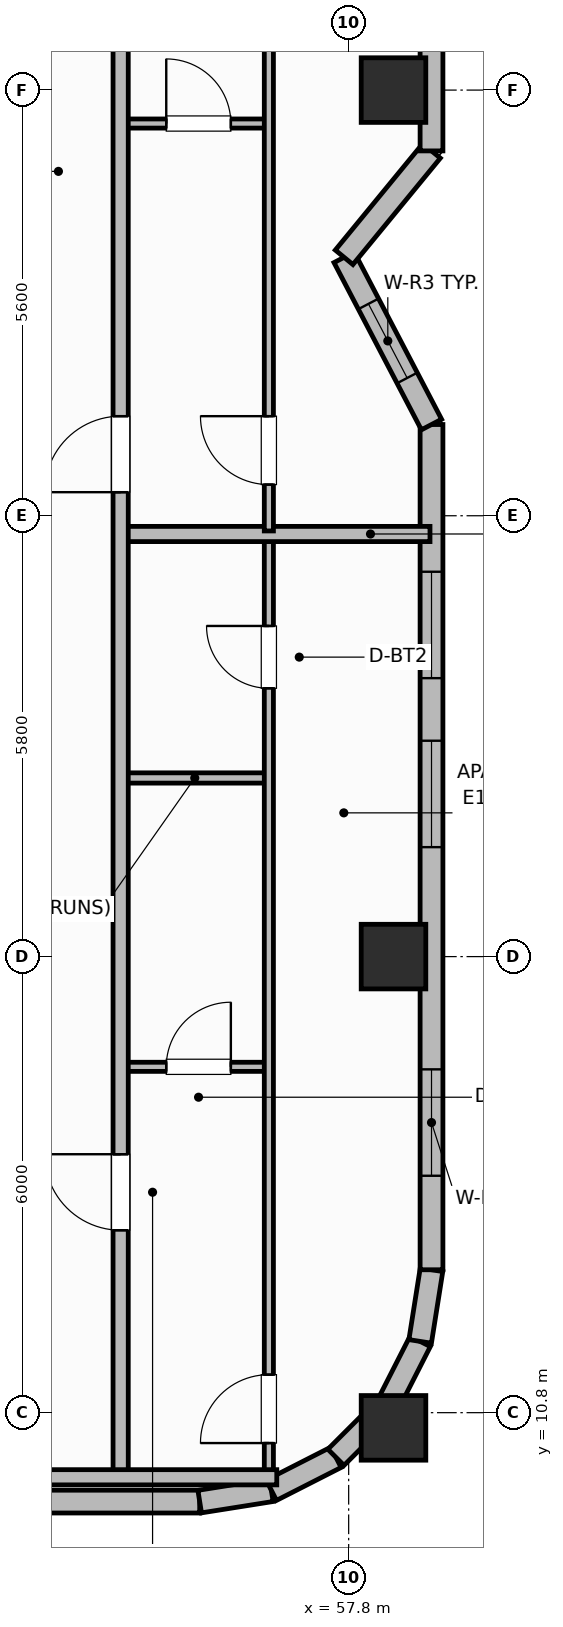
"""IFC4 building model, lengths in metres.
Left out: names, types, materials, properties, quantities, classifications, styles, units other than length and angle.
Written with IfcOpenShell. Run it as: python <this file> out.ifc"""

import sys

from ifc_helpers import new_model, si_unit, direction, frame, frame_2d, origin, origin_2d, place, context, subcontext, project, spatial, rectangle, extrude, element, fill, save


model = new_model("IFC4")
c1 = context("Model", 3, precision=1e-05, world=origin(), true_north=direction((0.0, 1.0)))
c2 = subcontext(c1, "Body", "Model", "MODEL_VIEW")
j1 = project(units=[si_unit("LENGTHUNIT", "METRE"), si_unit("PLANEANGLEUNIT", "RADIAN")], contexts=[c1])
p1 = place(None, origin())
s1 = spatial("IfcSite", under=j1, at=p1, CompositionType="ELEMENT")
p2 = place(p1, origin())
s2 = spatial("IfcBuilding", under=s1, at=p2, CompositionType="ELEMENT")
p3 = place(p2, frame((0.0, 0.0, 244.3)))
s3 = spatial("IfcBuildingStorey", under=s2, at=p3, CompositionType="ELEMENT", Elevation=244.3)
for number, where, z_axis, x_axis in (
    (1, (58.39, 10.6, 0.0), (0.0, 0.0, 1.0), (1.0, 0.0, 0.0)),
    (2, (58.39, 16.8, 0.0), (0.0, 0.0, 1.0), (1.0, 0.0, 0.0)),
    (3, (58.39, 28.2, 0.0), (0.0, 0.0, 1.0), (1.0, 0.0, 0.0)),
):
    element("IfcColumn", number, at=place(p3, frame(where, z_axis=z_axis, x_axis=x_axis)), inside=s3, PredefinedType="COLUMN", context=c2, shape_type="SweptSolid", body=[
        extrude(rectangle(XDim=0.85, YDim=0.85, at=origin_2d()), origin(), (0.0, 0.0, 1.0), 3.7),
    ])
p4 = place(p3, frame((22.56, 9.63, 0.0), z_axis=(0.0, 0.0, 1.0), x_axis=(1.0, 0.0, 0.0)))
e4 = element("IfcWall", 4, at=p4, inside=s3, PredefinedType="SOLIDWALL", context=c2, shape_type="SweptSolid", body=[
    extrude(rectangle(XDim=33.28, YDim=0.3, at=frame_2d((16.64, 0.0))), origin(), (0.0, 0.0, 1.0), 2.73),
])
p5 = place(p4, frame((4.647, 0.0, 0.71)))
e5 = element("IfcOpeningElement", 5, at=p5, cuts=e4, PredefinedType="OPENING", context=c2, shape_type="SweptSolid", body=[
    extrude(rectangle(XDim=1.6, YDim=1.9, at=frame_2d((0.8, 0.95))), frame((0.0, 0.16, 0.0), z_axis=(0.0, -1.0, 0.0), x_axis=(1.0, 0.0, 0.0)), (0.0, 0.0, 1.0), 0.32),
])
p6 = place(p4, frame((7.845, 0.0, 0.71)))
e6 = element("IfcOpeningElement", 6, at=p6, cuts=e4, PredefinedType="OPENING", context=c2, shape_type="SweptSolid", body=[
    extrude(rectangle(XDim=1.6, YDim=1.9, at=frame_2d((0.8, 0.95))), frame((0.0, 0.16, 0.0), z_axis=(0.0, -1.0, 0.0), x_axis=(1.0, 0.0, 0.0)), (0.0, 0.0, 1.0), 0.32),
])
p7 = place(p4, frame((14.241, 0.0, 0.71)))
e7 = element("IfcOpeningElement", 7, at=p7, cuts=e4, PredefinedType="OPENING", context=c2, shape_type="SweptSolid", body=[
    extrude(rectangle(XDim=1.6, YDim=1.9, at=frame_2d((0.8, 0.95))), frame((0.0, 0.16, 0.0), z_axis=(0.0, -1.0, 0.0), x_axis=(1.0, 0.0, 0.0)), (0.0, 0.0, 1.0), 0.32),
])
p8 = place(p4, frame((17.439, 0.0, 0.71)))
e8 = element("IfcOpeningElement", 8, at=p8, cuts=e4, PredefinedType="OPENING", context=c2, shape_type="SweptSolid", body=[
    extrude(rectangle(XDim=1.6, YDim=1.9, at=frame_2d((0.8, 0.95))), frame((0.0, 0.16, 0.0), z_axis=(0.0, -1.0, 0.0), x_axis=(1.0, 0.0, 0.0)), (0.0, 0.0, 1.0), 0.32),
])
p9 = place(p4, frame((23.835, 0.0, 0.71)))
e9 = element("IfcOpeningElement", 9, at=p9, cuts=e4, PredefinedType="OPENING", context=c2, shape_type="SweptSolid", body=[
    extrude(rectangle(XDim=1.6, YDim=1.9, at=frame_2d((0.8, 0.95))), frame((0.0, 0.16, 0.0), z_axis=(0.0, -1.0, 0.0), x_axis=(1.0, 0.0, 0.0)), (0.0, 0.0, 1.0), 0.32),
])
p10 = place(p4, frame((27.033, 0.0, 0.71)))
e10 = element("IfcOpeningElement", 10, at=p10, cuts=e4, PredefinedType="OPENING", context=c2, shape_type="SweptSolid", body=[
    extrude(rectangle(XDim=1.6, YDim=1.9, at=frame_2d((0.8, 0.95))), frame((0.0, 0.16, 0.0), z_axis=(0.0, -1.0, 0.0), x_axis=(1.0, 0.0, 0.0)), (0.0, 0.0, 1.0), 0.32),
])
p11 = place(p3, frame((55.84, 9.63, 0.0), z_axis=(0.0, 0.0, 1.0), x_axis=(0.987663181641, 0.156593229835, 0.0)))
e11 = element("IfcWall", 11, at=p11, inside=s3, PredefinedType="SOLIDWALL", context=c2, shape_type="SweptSolid", body=[
    extrude(rectangle(XDim=0.954, YDim=0.3, at=frame_2d((0.477, 0.0))), origin(), (0.0, 0.0, 1.0), 2.73),
])
for number, where, z_axis, x_axis in (
    (12, (56.782, 9.779, 0.0), (0.0, 0.0, 1.0), (0.891, 0.454, 0.0)),
    (13, (57.633, 10.212, 0.0), (0.0, 0.0, 1.0), (0.707, 0.707, 0.0)),
    (14, (58.308, 10.887, 0.0), (0.0, 0.0, 1.0), (0.454, 0.891, 0.0)),
):
    element("IfcWall", number, at=place(p3, frame(where, z_axis=z_axis, x_axis=x_axis)), inside=s3, PredefinedType="SOLIDWALL", context=c2, shape_type="SweptSolid", body=[
        extrude(rectangle(XDim=0.954, YDim=0.3, at=frame_2d((0.477, 0.0))), origin(), (0.0, 0.0, 1.0), 2.73),
    ])
p12 = place(p3, frame((58.741, 11.738, 0.0), z_axis=(0.0, 0.0, 1.0), x_axis=(0.156343617883, 0.987702725088, 0.0)))
e15 = element("IfcWall", 15, at=p12, inside=s3, PredefinedType="SOLIDWALL", context=c2, shape_type="SweptSolid", body=[
    extrude(rectangle(XDim=0.954, YDim=0.3, at=frame_2d((0.477, 0.0))), origin(), (0.0, 0.0, 1.0), 2.73),
])
p13 = place(p3, frame((58.89, 12.68, 0.0), z_axis=(0.0, 0.0, 1.0), x_axis=(0.0, 1.0, 0.0)))
e16 = element("IfcWall", 16, at=p13, inside=s3, PredefinedType="SOLIDWALL", context=c2, shape_type="SweptSolid", body=[
    extrude(rectangle(XDim=11.12, YDim=0.3, at=frame_2d((5.56, 0.0))), origin(), (0.0, 0.0, 1.0), 2.73),
])
p14 = place(p13, frame((1.237, 0.0, 0.76)))
e17 = element("IfcOpeningElement", 17, at=p14, cuts=e16, PredefinedType="OPENING", context=c2, shape_type="SweptSolid", body=[
    extrude(rectangle(XDim=1.4, YDim=1.85, at=frame_2d((0.7, 0.925))), frame((0.0, 0.16, 0.0), z_axis=(0.0, -1.0, 0.0), x_axis=(1.0, 0.0, 0.0)), (0.0, 0.0, 1.0), 0.32),
])
p15 = place(p13, frame((5.56, 0.0, 0.76)))
e18 = element("IfcOpeningElement", 18, at=p15, cuts=e16, PredefinedType="OPENING", context=c2, shape_type="SweptSolid", body=[
    extrude(rectangle(XDim=1.4, YDim=1.85, at=frame_2d((0.7, 0.925))), frame((0.0, 0.16, 0.0), z_axis=(0.0, -1.0, 0.0), x_axis=(1.0, 0.0, 0.0)), (0.0, 0.0, 1.0), 0.32),
])
p16 = place(p13, frame((7.783, 0.0, 0.76)))
e19 = element("IfcOpeningElement", 19, at=p16, cuts=e16, PredefinedType="OPENING", context=c2, shape_type="SweptSolid", body=[
    extrude(rectangle(XDim=1.4, YDim=1.85, at=frame_2d((0.7, 0.925))), frame((0.0, 0.16, 0.0), z_axis=(0.0, -1.0, 0.0), x_axis=(1.0, 0.0, 0.0)), (0.0, 0.0, 1.0), 0.32),
])
p17 = place(p3, frame((58.89, 23.8, 0.0), z_axis=(0.0, 0.0, 1.0), x_axis=(-0.46323138706, 0.886237373418, 0.0)))
e20 = element("IfcWall", 20, at=p17, inside=s3, PredefinedType="SOLIDWALL", context=c2, shape_type="SweptSolid", body=[
    extrude(rectangle(XDim=2.482, YDim=0.3, at=frame_2d((1.241, 0.0))), origin(), (0.0, 0.0, 1.0), 2.73),
])
p18 = place(p17, frame((0.691, 0.0, 0.92)))
e21 = element("IfcOpeningElement", 21, at=p18, cuts=e20, PredefinedType="OPENING", context=c2, shape_type="SweptSolid", body=[
    extrude(rectangle(XDim=1.1, YDim=1.65, at=frame_2d((0.55, 0.825))), frame((0.0, 0.16, 0.0), z_axis=(0.0, -1.0, 0.0), x_axis=(1.0, 0.0, 0.0)), (0.0, 0.0, 1.0), 0.32),
])
p19 = place(p3, frame((57.74, 26.0, 0.0), z_axis=(0.0, 0.0, 1.0), x_axis=(0.634733675645, 0.772730975827, 0.0)))
e22 = element("IfcWall", 22, at=p19, inside=s3, PredefinedType="SOLIDWALL", context=c2, shape_type="SweptSolid", body=[
    extrude(rectangle(XDim=1.812, YDim=0.3, at=frame_2d((0.906, 0.0))), origin(), (0.0, 0.0, 1.0), 2.73),
])
p20 = place(p3, frame((58.89, 27.4, 0.0), z_axis=(0.0, 0.0, 1.0), x_axis=(0.0, 1.0, 0.0)))
e23 = element("IfcWall", 23, at=p20, inside=s3, PredefinedType="SOLIDWALL", context=c2, shape_type="SweptSolid", body=[
    extrude(rectangle(XDim=1.6, YDim=0.3, at=frame_2d((0.8, 0.0))), origin(), (0.0, 0.0, 1.0), 2.73),
])
p21 = place(p3, frame((54.8, 15.35, 0.0), z_axis=(0.0, 0.0, 1.0), x_axis=(1.0, 0.0, 0.0)))
e24 = element("IfcWall", 24, at=p21, inside=s3, PredefinedType="PARTITIONING", context=c2, shape_type="SweptSolid", body=[
    extrude(rectangle(XDim=1.95, YDim=0.12, at=frame_2d((0.975, 0.0))), origin(), (0.0, 0.0, 1.0), 2.56),
])
p22 = place(p21, frame((0.6, 0.0, 0.0)))
e25 = element("IfcOpeningElement", 25, at=p22, cuts=e24, PredefinedType="OPENING", context=c2, shape_type="SweptSolid", body=[
    extrude(rectangle(XDim=0.85, YDim=2.1, at=frame_2d((0.425, 1.05))), frame((0.0, 0.07, 0.0), z_axis=(0.0, -1.0, 0.0), x_axis=(1.0, 0.0, 0.0)), (0.0, 0.0, 1.0), 0.14),
])
p23 = place(p3, frame((54.8, 19.15, 0.0), z_axis=(0.0, 0.0, 1.0), x_axis=(1.0, 0.0, 0.0)))
e26 = element("IfcWall", 26, at=p23, inside=s3, PredefinedType="PARTITIONING", context=c2, shape_type="SweptSolid", body=[
    extrude(rectangle(XDim=1.95, YDim=0.135, at=frame_2d((0.975, 0.0))), origin(), (0.0, 0.0, 1.0), 2.56),
])
p24 = place(p3, frame((56.75, 9.99, 0.0), z_axis=(0.0, 0.0, 1.0), x_axis=(0.0, 1.0, 0.0)))
e27 = element("IfcWall", 27, at=p24, inside=s3, PredefinedType="PARTITIONING", context=c2, shape_type="SweptSolid", body=[
    extrude(rectangle(XDim=12.33, YDim=0.12, at=frame_2d((6.165, 0.0))), origin(), (0.0, 0.0, 1.0), 2.56),
])
p25 = place(p24, frame((0.41, 0.0, 0.0)))
e28 = element("IfcOpeningElement", 28, at=p25, cuts=e27, PredefinedType="OPENING", context=c2, shape_type="SweptSolid", body=[
    extrude(rectangle(XDim=0.9, YDim=2.1, at=frame_2d((0.45, 1.05))), frame((0.0, 0.07, 0.0), z_axis=(0.0, -1.0, 0.0), x_axis=(1.0, 0.0, 0.0)), (0.0, 0.0, 1.0), 0.14),
])
p26 = place(p24, frame((10.34, 0.0, 0.0)))
e29 = element("IfcOpeningElement", 29, at=p26, cuts=e27, PredefinedType="OPENING", context=c2, shape_type="SweptSolid", body=[
    extrude(rectangle(XDim=0.82, YDim=2.08, at=frame_2d((0.41, 1.04))), frame((0.0, 0.07, 0.0), z_axis=(0.0, -1.0, 0.0), x_axis=(1.0, 0.0, 0.0)), (0.0, 0.0, 1.0), 0.14),
])
p27 = place(p3, frame((54.8, 22.36, 0.0), z_axis=(0.0, 0.0, 1.0), x_axis=(1.0, 0.0, 0.0)))
e30 = element("IfcWall", 30, at=p27, inside=s3, PredefinedType="PARTITIONING", context=c2, shape_type="SweptSolid", body=[
    extrude(rectangle(XDim=4.07, YDim=0.2, at=frame_2d((2.035, 0.0))), origin(), (0.0, 0.0, 1.0), 2.56),
])
p28 = place(p3, frame((54.8, 27.76, 0.0), z_axis=(0.0, 0.0, 1.0), x_axis=(1.0, 0.0, 0.0)))
e31 = element("IfcWall", 31, at=p28, inside=s3, PredefinedType="PARTITIONING", context=c2, shape_type="SweptSolid", body=[
    extrude(rectangle(XDim=1.95, YDim=0.12, at=frame_2d((0.975, 0.0))), origin(), (0.0, 0.0, 1.0), 2.56),
])
p29 = place(p28, frame((0.6, 0.0, 0.0)))
e32 = element("IfcOpeningElement", 32, at=p29, cuts=e31, PredefinedType="OPENING", context=c2, shape_type="SweptSolid", body=[
    extrude(rectangle(XDim=0.85, YDim=2.1, at=frame_2d((0.425, 1.05))), frame((0.0, 0.07, 0.0), z_axis=(0.0, -1.0, 0.0), x_axis=(1.0, 0.0, 0.0)), (0.0, 0.0, 1.0), 0.14),
])
p30 = place(p3, frame((56.75, 22.4, 0.0), z_axis=(0.0, 0.0, 1.0), x_axis=(0.0, 1.0, 0.0)))
e33 = element("IfcWall", 33, at=p30, inside=s3, PredefinedType="PARTITIONING", context=c2, shape_type="SweptSolid", body=[
    extrude(rectangle(XDim=11.26, YDim=0.12, at=frame_2d((5.63, 0.0))), origin(), (0.0, 0.0, 1.0), 2.56),
])
p31 = place(p30, frame((0.61, 0.0, 0.0)))
e34 = element("IfcOpeningElement", 34, at=p31, cuts=e33, PredefinedType="OPENING", context=c2, shape_type="SweptSolid", body=[
    extrude(rectangle(XDim=0.9, YDim=2.1, at=frame_2d((0.45, 1.05))), frame((0.0, 0.07, 0.0), z_axis=(0.0, -1.0, 0.0), x_axis=(1.0, 0.0, 0.0)), (0.0, 0.0, 1.0), 0.14),
])
p32 = place(p3, frame((54.8, 9.95, 0.0), z_axis=(0.0, 0.0, 1.0), x_axis=(0.0, 1.0, 0.0)))
e35 = element("IfcWall", 35, at=p32, inside=s3, PredefinedType="PARTITIONING", context=c2, shape_type="SweptSolid", body=[
    extrude(rectangle(XDim=36.5, YDim=0.2, at=frame_2d((18.25, 0.0))), origin(), (0.0, 0.0, 1.0), 2.56),
])
p33 = place(p32, frame((3.25, 0.0, 0.0)))
e36 = element("IfcOpeningElement", 36, at=p33, cuts=e35, PredefinedType="OPENING", context=c2, shape_type="SweptSolid", body=[
    extrude(rectangle(XDim=1.0, YDim=2.15, at=frame_2d((0.5, 1.075))), frame((0.0, 0.11, 0.0), z_axis=(0.0, -1.0, 0.0), x_axis=(1.0, 0.0, 0.0)), (0.0, 0.0, 1.0), 0.22),
])
p34 = place(p32, frame((12.96, 0.0, 0.0)))
e37 = element("IfcOpeningElement", 37, at=p34, cuts=e35, PredefinedType="OPENING", context=c2, shape_type="SweptSolid", body=[
    extrude(rectangle(XDim=1.0, YDim=2.15, at=frame_2d((0.5, 1.075))), frame((0.0, 0.11, 0.0), z_axis=(0.0, -1.0, 0.0), x_axis=(1.0, 0.0, 0.0)), (0.0, 0.0, 1.0), 0.22),
])
p35 = place(p32, frame((24.3, 0.0, 0.0)))
e38 = element("IfcOpeningElement", 38, at=p35, cuts=e35, PredefinedType="OPENING", context=c2, shape_type="SweptSolid", body=[
    extrude(rectangle(XDim=1.0, YDim=2.15, at=frame_2d((0.5, 1.075))), frame((0.0, 0.11, 0.0), z_axis=(0.0, -1.0, 0.0), x_axis=(1.0, 0.0, 0.0)), (0.0, 0.0, 1.0), 0.22),
])
p36 = place(p3, frame((53.1, 9.95, 0.0), z_axis=(0.0, 0.0, 1.0), x_axis=(1.0, 0.0, 0.0)))
e39 = element("IfcWall", 39, at=p36, inside=s3, PredefinedType="PARTITIONING", context=c2, shape_type="SweptSolid", body=[
    extrude(rectangle(XDim=3.754, YDim=0.2, at=frame_2d((1.877, 0.0))), origin(), (0.0, 0.0, 1.0), 2.56),
])
p37 = place(p14, origin())
e40 = element("IfcWindow", 40, at=p37, inside=s3, PartitioningType="SINGLE_PANEL", PredefinedType="WINDOW", context=c2, shape_type="SweptSolid", body=[
    extrude(rectangle(XDim=1.4, YDim=1.85, at=frame_2d((0.7, 0.925))), frame((0.0, 0.03, 0.0), z_axis=(0.0, -1.0, 0.0), x_axis=(1.0, 0.0, 0.0)), (0.0, 0.0, 1.0), 0.06),
])
fill(e17, e40)
p38 = place(p15, origin())
e41 = element("IfcWindow", 41, at=p38, inside=s3, PartitioningType="SINGLE_PANEL", PredefinedType="WINDOW", context=c2, shape_type="SweptSolid", body=[
    extrude(rectangle(XDim=1.4, YDim=1.85, at=frame_2d((0.7, 0.925))), frame((0.0, 0.03, 0.0), z_axis=(0.0, -1.0, 0.0), x_axis=(1.0, 0.0, 0.0)), (0.0, 0.0, 1.0), 0.06),
])
fill(e18, e41)
p39 = place(p16, origin())
e42 = element("IfcWindow", 42, at=p39, inside=s3, PartitioningType="SINGLE_PANEL", PredefinedType="WINDOW", context=c2, shape_type="SweptSolid", body=[
    extrude(rectangle(XDim=1.4, YDim=1.85, at=frame_2d((0.7, 0.925))), frame((0.0, 0.03, 0.0), z_axis=(0.0, -1.0, 0.0), x_axis=(1.0, 0.0, 0.0)), (0.0, 0.0, 1.0), 0.06),
])
fill(e19, e42)
p40 = place(p18, origin())
e43 = element("IfcWindow", 43, at=p40, inside=s3, PartitioningType="SINGLE_PANEL", PredefinedType="WINDOW", context=c2, shape_type="SweptSolid", body=[
    extrude(rectangle(XDim=1.1, YDim=1.65, at=frame_2d((0.55, 0.825))), frame((0.0, 0.03, 0.0), z_axis=(0.0, -1.0, 0.0), x_axis=(1.0, 0.0, 0.0)), (0.0, 0.0, 1.0), 0.06),
])
fill(e21, e43)
p41 = place(p22, origin())
e44 = element("IfcDoor", 44, at=p41, inside=s3, OperationType="SINGLE_SWING_RIGHT", PredefinedType="DOOR", context=c2, shape_type="SweptSolid", body=[
    extrude(rectangle(XDim=0.85, YDim=2.1, at=frame_2d((0.425, 1.05))), frame((0.0, 0.025, 0.0), z_axis=(0.0, -1.0, 0.0), x_axis=(1.0, 0.0, 0.0)), (0.0, 0.0, 1.0), 0.05),
])
fill(e25, e44)
p42 = place(p25, origin())
e45 = element("IfcDoor", 45, at=p42, inside=s3, OperationType="SINGLE_SWING_LEFT", PredefinedType="DOOR", context=c2, shape_type="SweptSolid", body=[
    extrude(rectangle(XDim=0.9, YDim=2.1, at=frame_2d((0.45, 1.05))), frame((0.0, 0.025, 0.0), z_axis=(0.0, -1.0, 0.0), x_axis=(1.0, 0.0, 0.0)), (0.0, 0.0, 1.0), 0.05),
])
fill(e28, e45)
p43 = place(p26, origin())
e46 = element("IfcDoor", 46, at=p43, inside=s3, OperationType="SINGLE_SWING_RIGHT", PredefinedType="DOOR", context=c2, shape_type="SweptSolid", body=[
    extrude(rectangle(XDim=0.82, YDim=2.08, at=frame_2d((0.41, 1.04))), frame((0.0, 0.025, 0.0), z_axis=(0.0, -1.0, 0.0), x_axis=(1.0, 0.0, 0.0)), (0.0, 0.0, 1.0), 0.05),
])
fill(e29, e46)
p44 = place(p29, origin())
e47 = element("IfcDoor", 47, at=p44, inside=s3, OperationType="SINGLE_SWING_LEFT", PredefinedType="DOOR", context=c2, shape_type="SweptSolid", body=[
    extrude(rectangle(XDim=0.85, YDim=2.1, at=frame_2d((0.425, 1.05))), frame((0.0, 0.025, 0.0), z_axis=(0.0, -1.0, 0.0), x_axis=(1.0, 0.0, 0.0)), (0.0, 0.0, 1.0), 0.05),
])
fill(e32, e47)
p45 = place(p31, origin())
e48 = element("IfcDoor", 48, at=p45, inside=s3, OperationType="SINGLE_SWING_RIGHT", PredefinedType="DOOR", context=c2, shape_type="SweptSolid", body=[
    extrude(rectangle(XDim=0.9, YDim=2.1, at=frame_2d((0.45, 1.05))), frame((0.0, 0.025, 0.0), z_axis=(0.0, -1.0, 0.0), x_axis=(1.0, 0.0, 0.0)), (0.0, 0.0, 1.0), 0.05),
])
fill(e34, e48)
p46 = place(p33, origin())
e49 = element("IfcDoor", 49, at=p46, inside=s3, OperationType="SINGLE_SWING_RIGHT", PredefinedType="DOOR", context=c2, shape_type="SweptSolid", body=[
    extrude(rectangle(XDim=1.0, YDim=2.15, at=frame_2d((0.5, 1.075))), frame((0.0, 0.025, 0.0), z_axis=(0.0, -1.0, 0.0), x_axis=(1.0, 0.0, 0.0)), (0.0, 0.0, 1.0), 0.05),
])
fill(e36, e49)
p47 = place(p34, origin())
e50 = element("IfcDoor", 50, at=p47, inside=s3, OperationType="SINGLE_SWING_LEFT", PredefinedType="DOOR", context=c2, shape_type="SweptSolid", body=[
    extrude(rectangle(XDim=1.0, YDim=2.15, at=frame_2d((0.5, 1.075))), frame((0.0, 0.025, 0.0), z_axis=(0.0, -1.0, 0.0), x_axis=(1.0, 0.0, 0.0)), (0.0, 0.0, 1.0), 0.05),
])
fill(e37, e50)
save(model, sys.argv[1])
